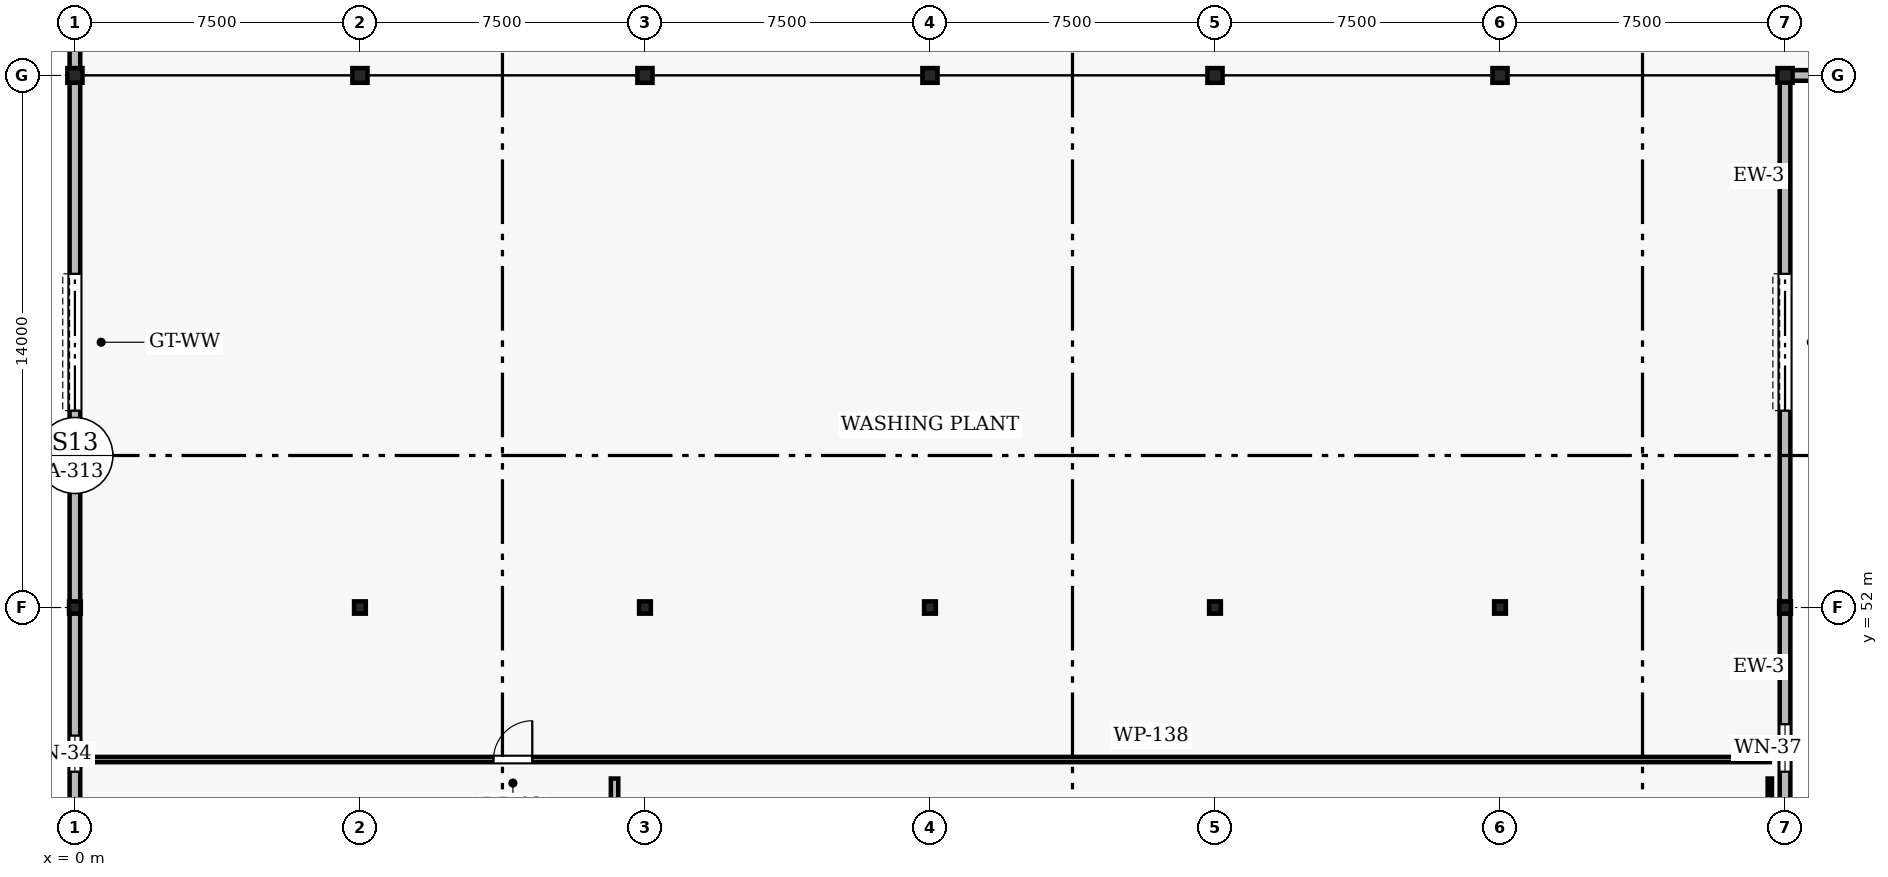
"""IFC4 building model, lengths in metres.
Left out: names, types, materials, properties, quantities, classifications, styles, units other than length and angle.
Written with IfcOpenShell. Run it as: python <this file> out.ifc"""

import sys

from ifc_helpers import new_model, si_unit, direction, frame, frame_2d, origin, origin_2d, place, context, subcontext, project, spatial, rectangle, i_section, extrude, element, fill, save


model = new_model("IFC4")
c1 = context("Model", 3, precision=1e-05, world=origin(), true_north=direction((0.0, 1.0)))
c2 = subcontext(c1, "Body", "Model", "MODEL_VIEW")
j1 = project(units=[si_unit("LENGTHUNIT", "METRE"), si_unit("PLANEANGLEUNIT", "RADIAN")], contexts=[c1])
p1 = place(None, origin())
s1 = spatial("IfcSite", under=j1, at=p1, CompositionType="ELEMENT")
p2 = place(p1, origin())
s2 = spatial("IfcBuilding", under=s1, at=p2, CompositionType="ELEMENT")
p3 = place(p2, origin())
s3 = spatial("IfcBuildingStorey", under=s2, at=p3, CompositionType="ELEMENT", Elevation=0.0)
p4 = place(p3, frame((0.0, 52.0, 0.0), z_axis=(0.0, 0.0, 1.0), x_axis=(1.0, 0.0, 0.0)))
e1 = element("IfcColumn", 1, at=p4, inside=s3, PredefinedType="COLUMN", context=c2, shape_type="SweptSolid", body=[
    extrude(i_section(OverallWidth=0.309, OverallDepth=0.323, WebThickness=0.014, FlangeThickness=0.023, FilletRadius=0.015, at=origin_2d()), origin(), (0.0, 0.0, 1.0), 4.5),
])
p5 = place(p3, frame((0.0, 66.0, 0.0), z_axis=(0.0, 0.0, 1.0), x_axis=(1.0, 0.0, 0.0)))
e2 = element("IfcColumn", 2, at=p5, inside=s3, PredefinedType="COLUMN", context=c2, shape_type="SweptSolid", body=[
    extrude(i_section(OverallWidth=0.398, OverallDepth=0.387, WebThickness=0.024, FlangeThickness=0.04, FilletRadius=0.018, at=origin_2d()), origin(), (0.0, 0.0, 1.0), 4.5),
])
p6 = place(p3, frame((7.5, 52.0, 0.0), z_axis=(0.0, 0.0, 1.0), x_axis=(1.0, 0.0, 0.0)))
e3 = element("IfcColumn", 3, at=p6, inside=s3, PredefinedType="COLUMN", context=c2, shape_type="SweptSolid", body=[
    extrude(i_section(OverallWidth=0.309, OverallDepth=0.323, WebThickness=0.014, FlangeThickness=0.023, FilletRadius=0.015, at=origin_2d()), origin(), (0.0, 0.0, 1.0), 4.5),
])
p7 = place(p3, frame((7.5, 66.0, 0.0), z_axis=(0.0, 0.0, 1.0), x_axis=(1.0, 0.0, 0.0)))
e4 = element("IfcColumn", 4, at=p7, inside=s3, PredefinedType="COLUMN", context=c2, shape_type="SweptSolid", body=[
    extrude(i_section(OverallWidth=0.398, OverallDepth=0.387, WebThickness=0.024, FlangeThickness=0.04, FilletRadius=0.018, at=origin_2d()), origin(), (0.0, 0.0, 1.0), 4.5),
])
p8 = place(p3, frame((15.0, 52.0, 0.0), z_axis=(0.0, 0.0, 1.0), x_axis=(1.0, 0.0, 0.0)))
e5 = element("IfcColumn", 5, at=p8, inside=s3, PredefinedType="COLUMN", context=c2, shape_type="SweptSolid", body=[
    extrude(i_section(OverallWidth=0.309, OverallDepth=0.323, WebThickness=0.014, FlangeThickness=0.023, FilletRadius=0.015, at=origin_2d()), origin(), (0.0, 0.0, 1.0), 4.5),
])
p9 = place(p3, frame((15.0, 66.0, 0.0), z_axis=(0.0, 0.0, 1.0), x_axis=(1.0, 0.0, 0.0)))
e6 = element("IfcColumn", 6, at=p9, inside=s3, PredefinedType="COLUMN", context=c2, shape_type="SweptSolid", body=[
    extrude(i_section(OverallWidth=0.398, OverallDepth=0.387, WebThickness=0.024, FlangeThickness=0.04, FilletRadius=0.018, at=origin_2d()), origin(), (0.0, 0.0, 1.0), 4.5),
])
p10 = place(p3, frame((22.5, 52.0, 0.0), z_axis=(0.0, 0.0, 1.0), x_axis=(1.0, 0.0, 0.0)))
e7 = element("IfcColumn", 7, at=p10, inside=s3, PredefinedType="COLUMN", context=c2, shape_type="SweptSolid", body=[
    extrude(i_section(OverallWidth=0.309, OverallDepth=0.323, WebThickness=0.014, FlangeThickness=0.023, FilletRadius=0.015, at=origin_2d()), origin(), (0.0, 0.0, 1.0), 4.5),
])
p11 = place(p3, frame((22.5, 66.0, 0.0), z_axis=(0.0, 0.0, 1.0), x_axis=(1.0, 0.0, 0.0)))
e8 = element("IfcColumn", 8, at=p11, inside=s3, PredefinedType="COLUMN", context=c2, shape_type="SweptSolid", body=[
    extrude(i_section(OverallWidth=0.398, OverallDepth=0.387, WebThickness=0.024, FlangeThickness=0.04, FilletRadius=0.018, at=origin_2d()), origin(), (0.0, 0.0, 1.0), 4.5),
])
p12 = place(p3, frame((30.0, 52.0, 0.0), z_axis=(0.0, 0.0, 1.0), x_axis=(1.0, 0.0, 0.0)))
e9 = element("IfcColumn", 9, at=p12, inside=s3, PredefinedType="COLUMN", context=c2, shape_type="SweptSolid", body=[
    extrude(i_section(OverallWidth=0.309, OverallDepth=0.323, WebThickness=0.014, FlangeThickness=0.023, FilletRadius=0.015, at=origin_2d()), origin(), (0.0, 0.0, 1.0), 4.5),
])
p13 = place(p3, frame((30.0, 66.0, 0.0), z_axis=(0.0, 0.0, 1.0), x_axis=(1.0, 0.0, 0.0)))
e10 = element("IfcColumn", 10, at=p13, inside=s3, PredefinedType="COLUMN", context=c2, shape_type="SweptSolid", body=[
    extrude(i_section(OverallWidth=0.398, OverallDepth=0.387, WebThickness=0.024, FlangeThickness=0.04, FilletRadius=0.018, at=origin_2d()), origin(), (0.0, 0.0, 1.0), 4.5),
])
p14 = place(p3, frame((37.5, 52.0, 0.0), z_axis=(0.0, 0.0, 1.0), x_axis=(1.0, 0.0, 0.0)))
e11 = element("IfcColumn", 11, at=p14, inside=s3, PredefinedType="COLUMN", context=c2, shape_type="SweptSolid", body=[
    extrude(i_section(OverallWidth=0.309, OverallDepth=0.323, WebThickness=0.014, FlangeThickness=0.023, FilletRadius=0.015, at=origin_2d()), origin(), (0.0, 0.0, 1.0), 4.5),
])
p15 = place(p3, frame((37.5, 66.0, 0.0), z_axis=(0.0, 0.0, 1.0), x_axis=(1.0, 0.0, 0.0)))
e12 = element("IfcColumn", 12, at=p15, inside=s3, PredefinedType="COLUMN", context=c2, shape_type="SweptSolid", body=[
    extrude(i_section(OverallWidth=0.398, OverallDepth=0.387, WebThickness=0.024, FlangeThickness=0.04, FilletRadius=0.018, at=origin_2d()), origin(), (0.0, 0.0, 1.0), 4.5),
])
p16 = place(p3, frame((45.0, 52.0, 0.0), z_axis=(0.0, 0.0, 1.0), x_axis=(1.0, 0.0, 0.0)))
e13 = element("IfcColumn", 13, at=p16, inside=s3, PredefinedType="COLUMN", context=c2, shape_type="SweptSolid", body=[
    extrude(i_section(OverallWidth=0.309, OverallDepth=0.323, WebThickness=0.014, FlangeThickness=0.023, FilletRadius=0.015, at=origin_2d()), origin(), (0.0, 0.0, 1.0), 4.5),
])
p17 = place(p3, frame((45.0, 66.0, 0.0), z_axis=(0.0, 0.0, 1.0), x_axis=(1.0, 0.0, 0.0)))
e14 = element("IfcColumn", 14, at=p17, inside=s3, PredefinedType="COLUMN", context=c2, shape_type="SweptSolid", body=[
    extrude(i_section(OverallWidth=0.398, OverallDepth=0.387, WebThickness=0.024, FlangeThickness=0.04, FilletRadius=0.018, at=origin_2d()), origin(), (0.0, 0.0, 1.0), 4.5),
])
p18 = place(p3, frame((45.08, 66.0, 0.0), z_axis=(0.0, 0.0, 1.0), x_axis=(1.0, 0.0, 0.0)))
e15 = element("IfcWall", 15, at=p18, inside=s3, PredefinedType="SOLIDWALL", context=c2, shape_type="SweptSolid", body=[
    extrude(rectangle(XDim=7.34, YDim=0.28, at=frame_2d((3.67, 0.0))), origin(), (0.0, 0.0, 1.0), 3.907),
])
p19 = place(p18, frame((1.65, 0.0, 0.0)))
e16 = element("IfcOpeningElement", 16, at=p19, cuts=e15, PredefinedType="OPENING", context=c2, shape_type="SweptSolid", body=[
    extrude(rectangle(XDim=3.8, YDim=3.3, at=frame_2d((1.9, 1.65))), frame((0.0, 0.15, 0.0), z_axis=(0.0, -1.0, 0.0), x_axis=(1.0, 0.0, 0.0)), (0.0, 0.0, 1.0), 0.3),
])
p20 = place(p3, frame((0.0, 66.08, 0.0), z_axis=(0.0, 0.0, 1.0), x_axis=(0.0, 1.0, 0.0)))
e17 = element("IfcWall", 17, at=p20, inside=s3, PredefinedType="SOLIDWALL", context=c2, shape_type="SweptSolid", body=[
    extrude(rectangle(XDim=5.92, YDim=0.28, at=frame_2d((2.96, 0.0))), origin(), (0.0, 0.0, 1.0), 3.805),
])
p21 = place(p20, frame((0.88, 0.0, 0.0)))
e18 = element("IfcOpeningElement", 18, at=p21, cuts=e17, PredefinedType="OPENING", context=c2, shape_type="SweptSolid", body=[
    extrude(rectangle(XDim=3.8, YDim=3.3, at=frame_2d((1.9, 1.65))), frame((0.0, 0.15, 0.0), z_axis=(0.0, -1.0, 0.0), x_axis=(1.0, 0.0, 0.0)), (0.0, 0.0, 1.0), 0.3),
])
p22 = place(p3, frame((0.0, 38.08, 0.0), z_axis=(0.0, 0.0, 1.0), x_axis=(0.0, 1.0, 0.0)))
e19 = element("IfcWall", 19, at=p22, inside=s3, PredefinedType="SOLIDWALL", context=c2, shape_type="SweptSolid", body=[
    extrude(rectangle(XDim=13.84, YDim=0.28, at=frame_2d((6.92, 0.0))), origin(), (0.0, 0.0, 1.0), 3.633),
])
p23 = place(p22, frame((1.6, 0.0, 1.35)))
e20 = element("IfcOpeningElement", 20, at=p23, cuts=e19, PredefinedType="OPENING", context=c2, shape_type="SweptSolid", body=[
    extrude(rectangle(XDim=2.4, YDim=1.5, at=frame_2d((1.2, 0.75))), frame((0.0, 0.15, 0.0), z_axis=(0.0, -1.0, 0.0), x_axis=(1.0, 0.0, 0.0)), (0.0, 0.0, 1.0), 0.3),
])
p24 = place(p22, frame((5.6, 0.0, 1.35)))
e21 = element("IfcOpeningElement", 21, at=p24, cuts=e19, PredefinedType="OPENING", context=c2, shape_type="SweptSolid", body=[
    extrude(rectangle(XDim=0.85, YDim=1.35, at=frame_2d((0.425, 0.675))), frame((0.0, 0.15, 0.0), z_axis=(0.0, -1.0, 0.0), x_axis=(1.0, 0.0, 0.0)), (0.0, 0.0, 1.0), 0.3),
])
p25 = place(p22, frame((9.6, 0.0, 1.35)))
e22 = element("IfcOpeningElement", 22, at=p25, cuts=e19, PredefinedType="OPENING", context=c2, shape_type="SweptSolid", body=[
    extrude(rectangle(XDim=0.95, YDim=1.4, at=frame_2d((0.475, 0.7))), frame((0.0, 0.15, 0.0), z_axis=(0.0, -1.0, 0.0), x_axis=(1.0, 0.0, 0.0)), (0.0, 0.0, 1.0), 0.3),
])
p26 = place(p3, frame((0.0, 52.08, 0.0), z_axis=(0.0, 0.0, 1.0), x_axis=(0.0, 1.0, 0.0)))
e23 = element("IfcWall", 23, at=p26, inside=s3, PredefinedType="SOLIDWALL", context=c2, shape_type="SweptSolid", body=[
    extrude(rectangle(XDim=13.84, YDim=0.28, at=frame_2d((6.92, 0.0))), origin(), (0.0, 0.0, 1.0), 3.633),
])
p27 = place(p26, frame((5.1, 0.0, 0.0)))
e24 = element("IfcOpeningElement", 24, at=p27, cuts=e23, PredefinedType="OPENING", context=c2, shape_type="SweptSolid", body=[
    extrude(rectangle(XDim=3.6, YDim=3.25, at=frame_2d((1.8, 1.625))), frame((0.0, 0.15, 0.0), z_axis=(0.0, -1.0, 0.0), x_axis=(1.0, 0.0, 0.0)), (0.0, 0.0, 1.0), 0.3),
])
p28 = place(p3, frame((45.0, 38.08, 0.0), z_axis=(0.0, 0.0, 1.0), x_axis=(0.0, 1.0, 0.0)))
e25 = element("IfcWall", 25, at=p28, inside=s3, PredefinedType="SOLIDWALL", context=c2, shape_type="SweptSolid", body=[
    extrude(rectangle(XDim=13.84, YDim=0.28, at=frame_2d((6.92, 0.0))), origin(), (0.0, 0.0, 1.0), 3.633),
])
p29 = place(p28, frame((1.6, 0.0, 1.35)))
e26 = element("IfcOpeningElement", 26, at=p29, cuts=e25, PredefinedType="OPENING", context=c2, shape_type="SweptSolid", body=[
    extrude(rectangle(XDim=1.05, YDim=1.45, at=frame_2d((0.525, 0.725))), frame((0.0, 0.15, 0.0), z_axis=(0.0, -1.0, 0.0), x_axis=(1.0, 0.0, 0.0)), (0.0, 0.0, 1.0), 0.3),
])
p30 = place(p28, frame((5.6, 0.0, 1.35)))
e27 = element("IfcOpeningElement", 27, at=p30, cuts=e25, PredefinedType="OPENING", context=c2, shape_type="SweptSolid", body=[
    extrude(rectangle(XDim=1.15, YDim=1.55, at=frame_2d((0.575, 0.775))), frame((0.0, 0.15, 0.0), z_axis=(0.0, -1.0, 0.0), x_axis=(1.0, 0.0, 0.0)), (0.0, 0.0, 1.0), 0.3),
])
p31 = place(p28, frame((9.6, 0.0, 1.35)))
e28 = element("IfcOpeningElement", 28, at=p31, cuts=e25, PredefinedType="OPENING", context=c2, shape_type="SweptSolid", body=[
    extrude(rectangle(XDim=1.25, YDim=1.45, at=frame_2d((0.625, 0.725))), frame((0.0, 0.15, 0.0), z_axis=(0.0, -1.0, 0.0), x_axis=(1.0, 0.0, 0.0)), (0.0, 0.0, 1.0), 0.3),
])
p32 = place(p3, frame((45.0, 52.08, 0.0), z_axis=(0.0, 0.0, 1.0), x_axis=(0.0, 1.0, 0.0)))
e29 = element("IfcWall", 29, at=p32, inside=s3, PredefinedType="SOLIDWALL", context=c2, shape_type="SweptSolid", body=[
    extrude(rectangle(XDim=13.84, YDim=0.28, at=frame_2d((6.92, 0.0))), origin(), (0.0, 0.0, 1.0), 3.633),
])
p33 = place(p32, frame((5.1, 0.0, 0.0)))
e30 = element("IfcOpeningElement", 30, at=p33, cuts=e29, PredefinedType="OPENING", context=c2, shape_type="SweptSolid", body=[
    extrude(rectangle(XDim=3.6, YDim=3.25, at=frame_2d((1.8, 1.625))), frame((0.0, 0.15, 0.0), z_axis=(0.0, -1.0, 0.0), x_axis=(1.0, 0.0, 0.0)), (0.0, 0.0, 1.0), 0.3),
])
p34 = place(p3, frame((0.16, 48.0, 0.0), z_axis=(0.0, 0.0, 1.0), x_axis=(1.0, 0.0, 0.0)))
e31 = element("IfcWall", 31, at=p34, inside=s3, PredefinedType="PARTITIONING", context=c2, shape_type="SweptSolid", body=[
    extrude(rectangle(XDim=44.44, YDim=0.138, at=frame_2d((22.22, 0.0))), origin(), (0.0, 0.0, 1.0), 3.7),
])
p35 = place(p34, frame((10.855, 0.0, 0.0)))
e32 = element("IfcOpeningElement", 32, at=p35, cuts=e31, PredefinedType="OPENING", context=c2, shape_type="SweptSolid", body=[
    extrude(rectangle(XDim=1.02, YDim=2.12, at=frame_2d((0.51, 1.06))), frame((0.0, 0.079, 0.0), z_axis=(0.0, -1.0, 0.0), x_axis=(1.0, 0.0, 0.0)), (0.0, 0.0, 1.0), 0.158),
])
p36 = place(p3, frame((44.6, 35.0, 0.0), z_axis=(0.0, 0.0, 1.0), x_axis=(0.0, 1.0, 0.0)))
e33 = element("IfcWall", 33, at=p36, inside=s3, PredefinedType="PARTITIONING", context=c2, shape_type="SweptSolid", body=[
    extrude(rectangle(XDim=12.5, YDim=0.114, at=frame_2d((6.25, 0.0))), origin(), (0.0, 0.0, 1.0), 3.633),
])
p37 = place(p3, frame((14.2, 35.0, 0.0), z_axis=(0.0, 0.0, 1.0), x_axis=(0.0, 1.0, 0.0)))
e34 = element("IfcWall", 34, at=p37, inside=s3, PredefinedType="PARTITIONING", context=c2, shape_type="SweptSolid", body=[
    extrude(rectangle(XDim=12.5, YDim=0.195, at=frame_2d((6.25, 0.0))), origin(), (0.0, 0.0, 1.0), 3.7),
])
p38 = place(p27, origin())
e35 = element("IfcDoor", 35, at=p38, inside=s3, OperationType="ROLLINGUP", PredefinedType="GATE", context=c2, shape_type="SweptSolid", body=[
    extrude(rectangle(XDim=3.6, YDim=3.25, at=frame_2d((1.8, 1.625))), frame((0.0, 0.025, 0.0), z_axis=(0.0, -1.0, 0.0), x_axis=(1.0, 0.0, 0.0)), (0.0, 0.0, 1.0), 0.05),
])
fill(e24, e35)
p39 = place(p33, origin())
e36 = element("IfcDoor", 36, at=p39, inside=s3, OperationType="ROLLINGUP", PredefinedType="GATE", context=c2, shape_type="SweptSolid", body=[
    extrude(rectangle(XDim=3.6, YDim=3.25, at=frame_2d((1.8, 1.625))), frame((0.0, 0.025, 0.0), z_axis=(0.0, -1.0, 0.0), x_axis=(1.0, 0.0, 0.0)), (0.0, 0.0, 1.0), 0.05),
])
fill(e30, e36)
p40 = place(p25, origin())
e37 = element("IfcWindow", 37, at=p40, inside=s3, PartitioningType="SINGLE_PANEL", PredefinedType="WINDOW", context=c2, shape_type="SweptSolid", body=[
    extrude(rectangle(XDim=0.95, YDim=1.4, at=frame_2d((0.475, 0.7))), frame((0.0, 0.03, 0.0), z_axis=(0.0, -1.0, 0.0), x_axis=(1.0, 0.0, 0.0)), (0.0, 0.0, 1.0), 0.06),
])
fill(e22, e37)
p41 = place(p31, origin())
e38 = element("IfcWindow", 38, at=p41, inside=s3, PartitioningType="SINGLE_PANEL", PredefinedType="WINDOW", context=c2, shape_type="SweptSolid", body=[
    extrude(rectangle(XDim=1.25, YDim=1.45, at=frame_2d((0.625, 0.725))), frame((0.0, 0.03, 0.0), z_axis=(0.0, -1.0, 0.0), x_axis=(1.0, 0.0, 0.0)), (0.0, 0.0, 1.0), 0.06),
])
fill(e28, e38)
p42 = place(p35, origin())
e39 = element("IfcDoor", 39, at=p42, inside=s3, OperationType="SINGLE_SWING_RIGHT", PredefinedType="DOOR", context=c2, shape_type="SweptSolid", body=[
    extrude(rectangle(XDim=1.02, YDim=2.12, at=frame_2d((0.51, 1.06))), frame((0.0, 0.025, 0.0), z_axis=(0.0, -1.0, 0.0), x_axis=(1.0, 0.0, 0.0)), (0.0, 0.0, 1.0), 0.05),
])
fill(e32, e39)
save(model, sys.argv[1])
